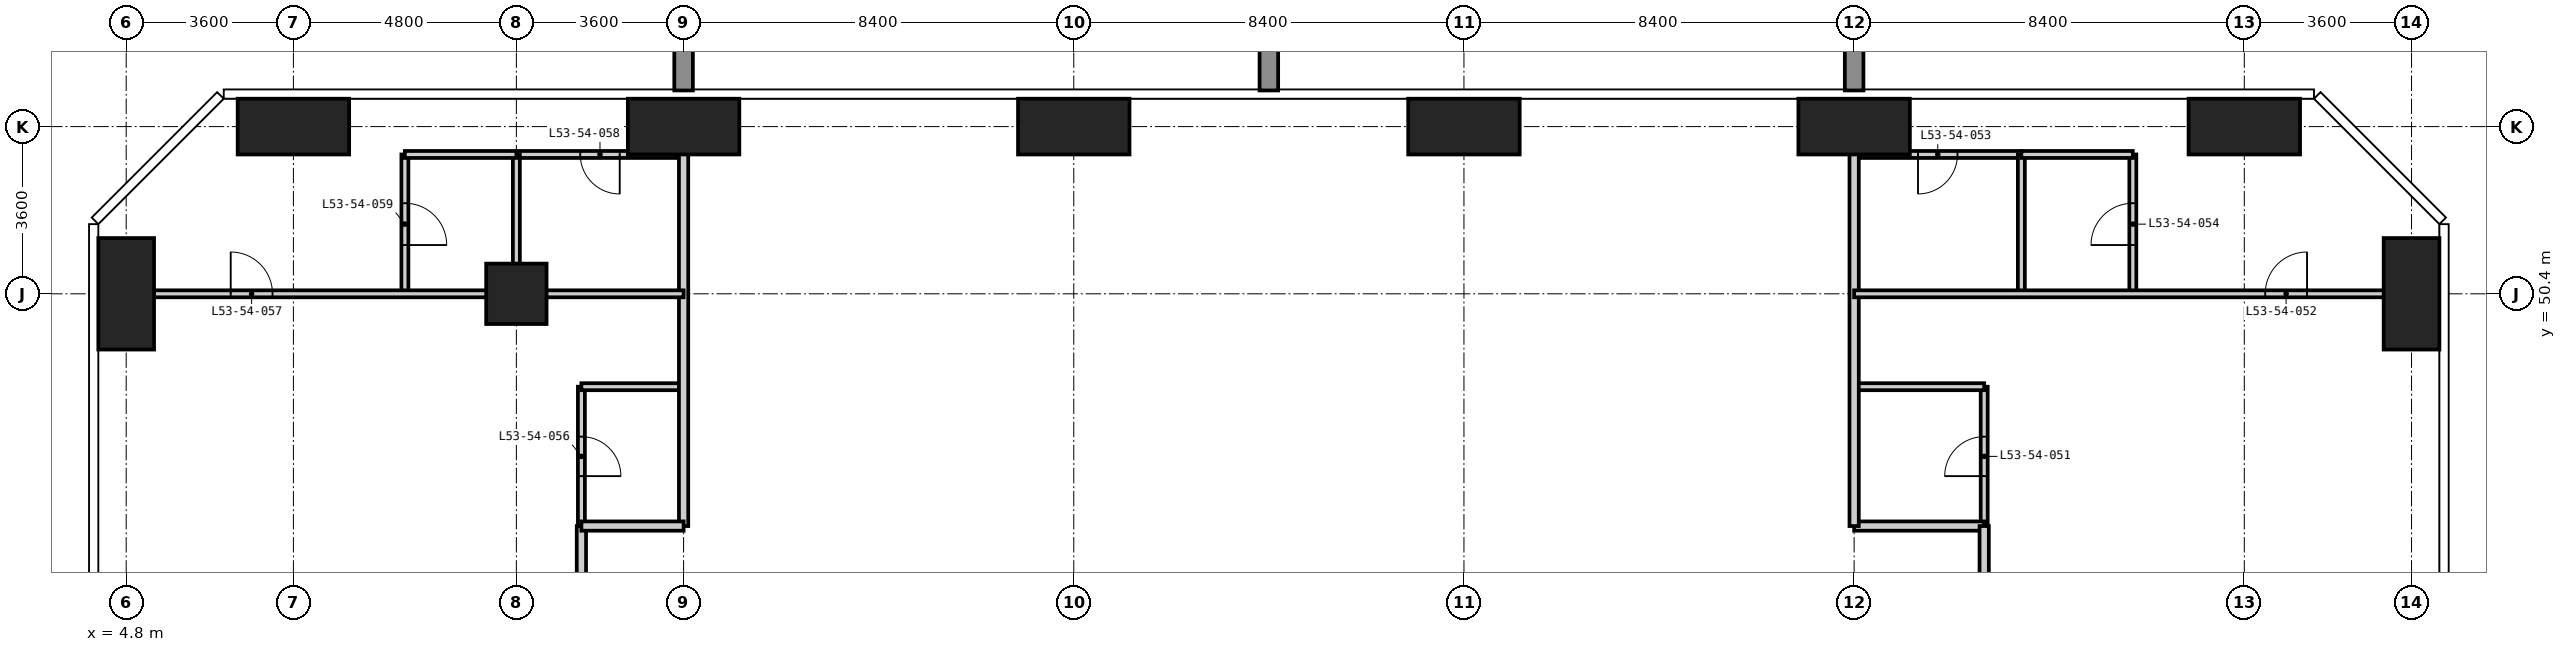
"""IFC4 building model, lengths in metres.
Left out: names, types, materials, properties, quantities, classifications, styles, units other than length and angle.
Written with IfcOpenShell. Run it as: python <this file> out.ifc"""

import sys

from ifc_helpers import new_model, si_unit, direction, frame, frame_2d, origin, origin_2d, place, context, subcontext, project, spatial, rectangle, extrude, element, fill, save


model = new_model("IFC4")
c1 = context("Model", 3, precision=1e-05, world=origin(), true_north=direction((0.0, 1.0)))
c2 = subcontext(c1, "Body", "Model", "MODEL_VIEW")
j1 = project(units=[si_unit("LENGTHUNIT", "METRE"), si_unit("PLANEANGLEUNIT", "RADIAN")], contexts=[c1])
p1 = place(None, origin())
s1 = spatial("IfcSite", under=j1, at=p1, CompositionType="ELEMENT")
p2 = place(p1, origin())
s2 = spatial("IfcBuilding", under=s1, at=p2, CompositionType="ELEMENT")
p3 = place(p2, frame((0.0, 0.0, 205.8)))
s3 = spatial("IfcBuildingStorey", under=s2, at=p3, CompositionType="ELEMENT", Elevation=205.8)
p4 = place(p3, frame((4.8, 50.4, -0.35), z_axis=(0.0, 0.0, 1.0), x_axis=(1.0, 0.0, 0.0)))
e1 = element("IfcColumn", 1, at=p4, inside=s3, PredefinedType="COLUMN", context=c2, shape_type="SweptSolid", body=[
    extrude(rectangle(XDim=1.2, YDim=2.4, at=origin_2d()), origin(), (0.0, 0.0, 1.0), 3.6),
])
p5 = place(p3, frame((8.4, 54.0, -0.35), z_axis=(0.0, 0.0, 1.0), x_axis=(1.0, 0.0, 0.0)))
e2 = element("IfcColumn", 2, at=p5, inside=s3, PredefinedType="COLUMN", context=c2, shape_type="SweptSolid", body=[
    extrude(rectangle(XDim=2.4, YDim=1.2, at=origin_2d()), origin(), (0.0, 0.0, 1.0), 3.6),
])
p6 = place(p3, frame((13.2, 50.4, -0.35), z_axis=(0.0, 0.0, 1.0), x_axis=(1.0, 0.0, 0.0)))
e3 = element("IfcColumn", 3, at=p6, inside=s3, PredefinedType="COLUMN", context=c2, shape_type="SweptSolid", body=[
    extrude(rectangle(XDim=1.3, YDim=1.3, at=origin_2d()), origin(), (0.0, 0.0, 1.0), 3.6),
])
for number, where, z_axis, x_axis in (
    (4, (16.8, 54.0, -0.35), (0.0, 0.0, 1.0), (1.0, 0.0, 0.0)),
    (5, (25.2, 54.0, -0.35), (0.0, 0.0, 1.0), (1.0, 0.0, 0.0)),
    (6, (33.6, 54.0, -0.35), (0.0, 0.0, 1.0), (1.0, 0.0, 0.0)),
    (7, (42.0, 54.0, -0.35), (0.0, 0.0, 1.0), (1.0, 0.0, 0.0)),
    (8, (50.4, 54.0, -0.35), (0.0, 0.0, 1.0), (1.0, 0.0, 0.0)),
):
    element("IfcColumn", number, at=place(p3, frame(where, z_axis=z_axis, x_axis=x_axis)), inside=s3, PredefinedType="COLUMN", context=c2, shape_type="SweptSolid", body=[
        extrude(rectangle(XDim=2.4, YDim=1.2, at=origin_2d()), origin(), (0.0, 0.0, 1.0), 3.6),
    ])
p7 = place(p3, frame((54.0, 50.4, -0.35), z_axis=(0.0, 0.0, 1.0), x_axis=(1.0, 0.0, 0.0)))
e9 = element("IfcColumn", 9, at=p7, inside=s3, PredefinedType="COLUMN", context=c2, shape_type="SweptSolid", body=[
    extrude(rectangle(XDim=1.2, YDim=2.4, at=origin_2d()), origin(), (0.0, 0.0, 1.0), 3.6),
])
p8 = place(p3, frame((14.6, 45.4, 0.0), z_axis=(0.0, 0.0, 1.0), x_axis=(0.0, 1.0, 0.0)))
e10 = element("IfcWall", 10, at=p8, inside=s3, PredefinedType="PARTITIONING", context=c2, shape_type="SweptSolid", body=[
    extrude(rectangle(XDim=3.0, YDim=0.15, at=frame_2d((1.5, 0.0))), origin(), (0.0, 0.0, 1.0), 3.25),
])
p9 = place(p8, frame((1.075, 0.0, 0.0)))
e11 = element("IfcOpeningElement", 11, at=p9, cuts=e10, PredefinedType="OPENING", context=c2, shape_type="SweptSolid", body=[
    extrude(rectangle(XDim=0.85, YDim=2.1, at=frame_2d((0.425, 1.05))), frame((0.0, 0.085, 0.0), z_axis=(0.0, -1.0, 0.0), x_axis=(1.0, 0.0, 0.0)), (0.0, 0.0, 1.0), 0.17),
])
p10 = place(p3, frame((44.8, 45.4, 0.0), z_axis=(0.0, 0.0, 1.0), x_axis=(0.0, 1.0, 0.0)))
e12 = element("IfcWall", 12, at=p10, inside=s3, PredefinedType="PARTITIONING", context=c2, shape_type="SweptSolid", body=[
    extrude(rectangle(XDim=3.0, YDim=0.15, at=frame_2d((1.5, 0.0))), origin(), (0.0, 0.0, 1.0), 3.25),
])
p11 = place(p10, frame((1.075, 0.0, 0.0)))
e13 = element("IfcOpeningElement", 13, at=p11, cuts=e12, PredefinedType="OPENING", context=c2, shape_type="SweptSolid", body=[
    extrude(rectangle(XDim=0.85, YDim=2.1, at=frame_2d((0.425, 1.05))), frame((0.0, 0.085, 0.0), z_axis=(0.0, -1.0, 0.0), x_axis=(1.0, 0.0, 0.0)), (0.0, 0.0, 1.0), 0.17),
])
p12 = place(p3, frame((14.6, 48.4, 0.0), z_axis=(0.0, 0.0, 1.0), x_axis=(1.0, 0.0, 0.0)))
e14 = element("IfcWall", 14, at=p12, inside=s3, PredefinedType="PARTITIONING", context=c2, shape_type="SweptSolid", body=[
    extrude(rectangle(XDim=2.2, YDim=0.15, at=frame_2d((1.1, 0.0))), origin(), (0.0, 0.0, 1.0), 3.25),
])
p13 = place(p3, frame((42.0, 48.4, 0.0), z_axis=(0.0, 0.0, 1.0), x_axis=(1.0, 0.0, 0.0)))
e15 = element("IfcWall", 15, at=p13, inside=s3, PredefinedType="PARTITIONING", context=c2, shape_type="SweptSolid", body=[
    extrude(rectangle(XDim=2.8, YDim=0.15, at=frame_2d((1.4, 0.0))), origin(), (0.0, 0.0, 1.0), 3.25),
])
p14 = place(p3, frame((13.2, 53.4, 0.0), z_axis=(0.0, 0.0, 1.0), x_axis=(1.0, 0.0, 0.0)))
e16 = element("IfcWall", 16, at=p14, inside=s3, PredefinedType="PARTITIONING", context=c2, shape_type="SweptSolid", body=[
    extrude(rectangle(XDim=3.6, YDim=0.15, at=frame_2d((1.8, 0.0))), origin(), (0.0, 0.0, 1.0), 3.25),
])
p15 = place(p14, frame((1.375, 0.0, 0.0)))
e17 = element("IfcOpeningElement", 17, at=p15, cuts=e16, PredefinedType="OPENING", context=c2, shape_type="SweptSolid", body=[
    extrude(rectangle(XDim=0.85, YDim=2.1, at=frame_2d((0.425, 1.05))), frame((0.0, 0.085, 0.0), z_axis=(0.0, -1.0, 0.0), x_axis=(1.0, 0.0, 0.0)), (0.0, 0.0, 1.0), 0.17),
])
p16 = place(p3, frame((42.0, 53.4, 0.0), z_axis=(0.0, 0.0, 1.0), x_axis=(1.0, 0.0, 0.0)))
e18 = element("IfcWall", 18, at=p16, inside=s3, PredefinedType="PARTITIONING", context=c2, shape_type="SweptSolid", body=[
    extrude(rectangle(XDim=3.6, YDim=0.15, at=frame_2d((1.8, 0.0))), origin(), (0.0, 0.0, 1.0), 3.25),
])
p17 = place(p16, frame((1.375, 0.0, 0.0)))
e19 = element("IfcOpeningElement", 19, at=p17, cuts=e18, PredefinedType="OPENING", context=c2, shape_type="SweptSolid", body=[
    extrude(rectangle(XDim=0.85, YDim=2.1, at=frame_2d((0.425, 1.05))), frame((0.0, 0.085, 0.0), z_axis=(0.0, -1.0, 0.0), x_axis=(1.0, 0.0, 0.0)), (0.0, 0.0, 1.0), 0.17),
])
p18 = place(p3, frame((14.6, 29.4, 0.0), z_axis=(0.0, 0.0, 1.0), x_axis=(0.0, 1.0, 0.0)))
e20 = element("IfcWall", 20, at=p18, inside=s3, PredefinedType="PARTITIONING", context=c2, shape_type="SweptSolid", body=[
    extrude(rectangle(XDim=16.0, YDim=0.2, at=frame_2d((8.0, 0.0))), origin(), (0.0, 0.0, 1.0), 3.25),
])
p19 = place(p18, frame((9.1, 0.0, 0.0)))
e21 = element("IfcOpeningElement", 21, at=p19, cuts=e20, PredefinedType="OPENING", context=c2, shape_type="SweptSolid", body=[
    extrude(rectangle(XDim=1.0, YDim=2.2, at=frame_2d((0.5, 1.1))), frame((0.0, 0.11, 0.0), z_axis=(0.0, -1.0, 0.0), x_axis=(1.0, 0.0, 0.0)), (0.0, 0.0, 1.0), 0.22),
])
p20 = place(p18, frame((13.8, 0.0, 0.0)))
e22 = element("IfcOpeningElement", 22, at=p20, cuts=e20, PredefinedType="OPENING", context=c2, shape_type="SweptSolid", body=[
    extrude(rectangle(XDim=1.0, YDim=2.2, at=frame_2d((0.5, 1.1))), frame((0.0, 0.11, 0.0), z_axis=(0.0, -1.0, 0.0), x_axis=(1.0, 0.0, 0.0)), (0.0, 0.0, 1.0), 0.22),
])
p21 = place(p3, frame((16.8, 45.4, 0.0), z_axis=(0.0, 0.0, 1.0), x_axis=(0.0, 1.0, 0.0)))
e23 = element("IfcWall", 23, at=p21, inside=s3, PredefinedType="PARTITIONING", context=c2, shape_type="SweptSolid", body=[
    extrude(rectangle(XDim=9.218, YDim=0.2, at=frame_2d((4.609, 0.0))), origin(), (0.0, 0.0, 1.0), 3.25),
])
p22 = place(p3, frame((14.6, 45.4, 0.0), z_axis=(0.0, 0.0, 1.0), x_axis=(1.0, 0.0, 0.0)))
e24 = element("IfcWall", 24, at=p22, inside=s3, PredefinedType="PARTITIONING", context=c2, shape_type="SweptSolid", body=[
    extrude(rectangle(XDim=2.2, YDim=0.2, at=frame_2d((1.1, 0.0))), origin(), (0.0, 0.0, 1.0), 3.25),
])
p23 = place(p3, frame((42.0, 45.4, 0.0), z_axis=(0.0, 0.0, 1.0), x_axis=(1.0, 0.0, 0.0)))
e25 = element("IfcWall", 25, at=p23, inside=s3, PredefinedType="PARTITIONING", context=c2, shape_type="SweptSolid", body=[
    extrude(rectangle(XDim=2.8, YDim=0.2, at=frame_2d((1.4, 0.0))), origin(), (0.0, 0.0, 1.0), 3.25),
])
p24 = place(p3, frame((42.0, 54.618, 0.0), z_axis=(0.0, 0.0, 1.0), x_axis=(0.0, -1.0, 0.0)))
e26 = element("IfcWall", 26, at=p24, inside=s3, PredefinedType="PARTITIONING", context=c2, shape_type="SweptSolid", body=[
    extrude(rectangle(XDim=9.218, YDim=0.2, at=frame_2d((4.609, 0.0))), origin(), (0.0, 0.0, 1.0), 3.25),
])
p25 = place(p3, frame((44.8, 45.4, 0.0), z_axis=(0.0, 0.0, 1.0), x_axis=(0.0, -1.0, 0.0)))
e27 = element("IfcWall", 27, at=p25, inside=s3, PredefinedType="PARTITIONING", context=c2, shape_type="SweptSolid", body=[
    extrude(rectangle(XDim=30.8, YDim=0.2, at=frame_2d((15.4, 0.0))), origin(), (0.0, 0.0, 1.0), 3.25),
])
p26 = place(p25, frame((26.0, 0.0, 0.0)))
e28 = element("IfcOpeningElement", 28, at=p26, cuts=e27, PredefinedType="OPENING", context=c2, shape_type="SweptSolid", body=[
    extrude(rectangle(XDim=1.0, YDim=2.2, at=frame_2d((0.5, 1.1))), frame((0.0, 0.11, 0.0), z_axis=(0.0, -1.0, 0.0), x_axis=(1.0, 0.0, 0.0)), (0.0, 0.0, 1.0), 0.22),
])
p27 = place(p25, frame((21.8, 0.0, 0.0)))
e29 = element("IfcOpeningElement", 29, at=p27, cuts=e27, PredefinedType="OPENING", context=c2, shape_type="SweptSolid", body=[
    extrude(rectangle(XDim=1.0, YDim=2.2, at=frame_2d((0.5, 1.1))), frame((0.0, 0.11, 0.0), z_axis=(0.0, -1.0, 0.0), x_axis=(1.0, 0.0, 0.0)), (0.0, 0.0, 1.0), 0.22),
])
p28 = place(p25, frame((16.7, 0.0, 0.0)))
e30 = element("IfcOpeningElement", 30, at=p28, cuts=e27, PredefinedType="OPENING", context=c2, shape_type="SweptSolid", body=[
    extrude(rectangle(XDim=1.0, YDim=2.2, at=frame_2d((0.5, 1.1))), frame((0.0, 0.11, 0.0), z_axis=(0.0, -1.0, 0.0), x_axis=(1.0, 0.0, 0.0)), (0.0, 0.0, 1.0), 0.22),
])
p29 = place(p25, frame((5.0, 0.0, 0.0)))
e31 = element("IfcOpeningElement", 31, at=p29, cuts=e27, PredefinedType="OPENING", context=c2, shape_type="SweptSolid", body=[
    extrude(rectangle(XDim=1.0, YDim=2.2, at=frame_2d((0.5, 1.1))), frame((0.0, 0.11, 0.0), z_axis=(0.0, -1.0, 0.0), x_axis=(1.0, 0.0, 0.0)), (0.0, 0.0, 1.0), 0.22),
])
p30 = place(p25, frame((29.2, 0.0, 0.0)))
e32 = element("IfcOpeningElement", 32, at=p30, cuts=e27, PredefinedType="OPENING", context=c2, shape_type="SweptSolid", body=[
    extrude(rectangle(XDim=1.0, YDim=2.2, at=frame_2d((0.5, 1.1))), frame((0.0, 0.11, 0.0), z_axis=(0.0, -1.0, 0.0), x_axis=(1.0, 0.0, 0.0)), (0.0, 0.0, 1.0), 0.22),
])
p31 = place(p25, frame((1.2, 0.0, 0.0)))
e33 = element("IfcOpeningElement", 33, at=p31, cuts=e27, PredefinedType="OPENING", context=c2, shape_type="SweptSolid", body=[
    extrude(rectangle(XDim=1.0, YDim=2.2, at=frame_2d((0.5, 1.1))), frame((0.0, 0.11, 0.0), z_axis=(0.0, -1.0, 0.0), x_axis=(1.0, 0.0, 0.0)), (0.0, 0.0, 1.0), 0.22),
])
p32 = place(p3, frame((10.8, 50.4, 0.0), z_axis=(0.0, 0.0, 1.0), x_axis=(0.0, 1.0, 0.0)))
e34 = element("IfcWall", 34, at=p32, inside=s3, PredefinedType="PARTITIONING", context=c2, shape_type="SweptSolid", body=[
    extrude(rectangle(XDim=3.0, YDim=0.15, at=frame_2d((1.5, 0.0))), origin(), (0.0, 0.0, 1.0), 3.25),
])
p33 = place(p32, frame((1.05, 0.0, 0.0)))
e35 = element("IfcOpeningElement", 35, at=p33, cuts=e34, PredefinedType="OPENING", context=c2, shape_type="SweptSolid", body=[
    extrude(rectangle(XDim=0.9, YDim=2.1, at=frame_2d((0.45, 1.05))), frame((0.0, 0.085, 0.0), z_axis=(0.0, -1.0, 0.0), x_axis=(1.0, 0.0, 0.0)), (0.0, 0.0, 1.0), 0.17),
])
for number, where, z_axis, x_axis in (
    (36, (13.2, 50.4, 0.0), (0.0, 0.0, 1.0), (0.0, 1.0, 0.0)),
    (37, (45.6, 50.4, 0.0), (0.0, 0.0, 1.0), (0.0, 1.0, 0.0)),
):
    element("IfcWall", number, at=place(p3, frame(where, z_axis=z_axis, x_axis=x_axis)), inside=s3, PredefinedType="PARTITIONING", context=c2, shape_type="SweptSolid", body=[
        extrude(rectangle(XDim=3.0, YDim=0.15, at=frame_2d((1.5, 0.0))), origin(), (0.0, 0.0, 1.0), 3.25),
    ])
p34 = place(p3, frame((48.0, 50.4, 0.0), z_axis=(0.0, 0.0, 1.0), x_axis=(0.0, 1.0, 0.0)))
e38 = element("IfcWall", 38, at=p34, inside=s3, PredefinedType="PARTITIONING", context=c2, shape_type="SweptSolid", body=[
    extrude(rectangle(XDim=3.0, YDim=0.15, at=frame_2d((1.5, 0.0))), origin(), (0.0, 0.0, 1.0), 3.25),
])
p35 = place(p34, frame((1.05, 0.0, 0.0)))
e39 = element("IfcOpeningElement", 39, at=p35, cuts=e38, PredefinedType="OPENING", context=c2, shape_type="SweptSolid", body=[
    extrude(rectangle(XDim=0.9, YDim=2.1, at=frame_2d((0.45, 1.05))), frame((0.0, 0.085, 0.0), z_axis=(0.0, -1.0, 0.0), x_axis=(1.0, 0.0, 0.0)), (0.0, 0.0, 1.0), 0.17),
])
p36 = place(p3, frame((4.182, 50.4, 0.0), z_axis=(0.0, 0.0, 1.0), x_axis=(1.0, 0.0, 0.0)))
e40 = element("IfcWall", 40, at=p36, inside=s3, PredefinedType="PARTITIONING", context=c2, shape_type="SweptSolid", body=[
    extrude(rectangle(XDim=12.618, YDim=0.15, at=frame_2d((6.309, 0.0))), origin(), (0.0, 0.0, 1.0), 3.25),
])
p37 = place(p36, frame((2.868, 0.0, 0.0)))
e41 = element("IfcOpeningElement", 41, at=p37, cuts=e40, PredefinedType="OPENING", context=c2, shape_type="SweptSolid", body=[
    extrude(rectangle(XDim=0.9, YDim=2.1, at=frame_2d((0.45, 1.05))), frame((0.0, 0.085, 0.0), z_axis=(0.0, -1.0, 0.0), x_axis=(1.0, 0.0, 0.0)), (0.0, 0.0, 1.0), 0.17),
])
p38 = place(p3, frame((42.0, 50.4, 0.0), z_axis=(0.0, 0.0, 1.0), x_axis=(1.0, 0.0, 0.0)))
e42 = element("IfcWall", 42, at=p38, inside=s3, PredefinedType="PARTITIONING", context=c2, shape_type="SweptSolid", body=[
    extrude(rectangle(XDim=12.618, YDim=0.15, at=frame_2d((6.309, 0.0))), origin(), (0.0, 0.0, 1.0), 3.25),
])
p39 = place(p38, frame((8.85, 0.0, 0.0)))
e43 = element("IfcOpeningElement", 43, at=p39, cuts=e42, PredefinedType="OPENING", context=c2, shape_type="SweptSolid", body=[
    extrude(rectangle(XDim=0.9, YDim=2.1, at=frame_2d((0.45, 1.05))), frame((0.0, 0.085, 0.0), z_axis=(0.0, -1.0, 0.0), x_axis=(1.0, 0.0, 0.0)), (0.0, 0.0, 1.0), 0.17),
])
for number, where, z_axis, x_axis in (
    (44, (10.8, 53.4, 0.0), (0.0, 0.0, 1.0), (1.0, 0.0, 0.0)),
    (45, (45.6, 53.4, 0.0), (0.0, 0.0, 1.0), (1.0, 0.0, 0.0)),
):
    element("IfcWall", number, at=place(p3, frame(where, z_axis=z_axis, x_axis=x_axis)), inside=s3, PredefinedType="PARTITIONING", context=c2, shape_type="SweptSolid", body=[
        extrude(rectangle(XDim=2.4, YDim=0.15, at=frame_2d((1.2, 0.0))), origin(), (0.0, 0.0, 1.0), 3.25),
    ])
p40 = place(p11, origin())
e46 = element("IfcDoor", 46, at=p40, inside=s3, OperationType="SINGLE_SWING_LEFT", PredefinedType="DOOR", context=c2, shape_type="SweptSolid", body=[
    extrude(rectangle(XDim=0.85, YDim=2.1, at=frame_2d((0.425, 1.05))), frame((0.0, 0.025, 0.0), z_axis=(0.0, -1.0, 0.0), x_axis=(1.0, 0.0, 0.0)), (0.0, 0.0, 1.0), 0.05),
])
fill(e13, e46)
p41 = place(p39, origin())
e47 = element("IfcDoor", 47, at=p41, inside=s3, OperationType="SINGLE_SWING_RIGHT", PredefinedType="DOOR", context=c2, shape_type="SweptSolid", body=[
    extrude(rectangle(XDim=0.9, YDim=2.1, at=frame_2d((0.45, 1.05))), frame((0.0, 0.025, 0.0), z_axis=(0.0, -1.0, 0.0), x_axis=(1.0, 0.0, 0.0)), (0.0, 0.0, 1.0), 0.05),
])
fill(e43, e47)
p42 = place(p17, frame((0.85, 0.0, 0.0), z_axis=(0.0, 0.0, 1.0), x_axis=(-1.0, 0.0, 0.0)))
e48 = element("IfcDoor", 48, at=p42, inside=s3, OperationType="SINGLE_SWING_RIGHT", PredefinedType="DOOR", context=c2, shape_type="SweptSolid", body=[
    extrude(rectangle(XDim=0.85, YDim=2.1, at=frame_2d((0.425, 1.05))), frame((0.0, 0.025, 0.0), z_axis=(0.0, -1.0, 0.0), x_axis=(1.0, 0.0, 0.0)), (0.0, 0.0, 1.0), 0.05),
])
fill(e19, e48)
p43 = place(p35, origin())
e49 = element("IfcDoor", 49, at=p43, inside=s3, OperationType="SINGLE_SWING_LEFT", PredefinedType="DOOR", context=c2, shape_type="SweptSolid", body=[
    extrude(rectangle(XDim=0.9, YDim=2.1, at=frame_2d((0.45, 1.05))), frame((0.0, 0.025, 0.0), z_axis=(0.0, -1.0, 0.0), x_axis=(1.0, 0.0, 0.0)), (0.0, 0.0, 1.0), 0.05),
])
fill(e39, e49)
p44 = place(p9, frame((0.85, 0.0, 0.0), z_axis=(0.0, 0.0, 1.0), x_axis=(-1.0, 0.0, 0.0)))
e50 = element("IfcDoor", 50, at=p44, inside=s3, OperationType="SINGLE_SWING_RIGHT", PredefinedType="DOOR", context=c2, shape_type="SweptSolid", body=[
    extrude(rectangle(XDim=0.85, YDim=2.1, at=frame_2d((0.425, 1.05))), frame((0.0, 0.025, 0.0), z_axis=(0.0, -1.0, 0.0), x_axis=(1.0, 0.0, 0.0)), (0.0, 0.0, 1.0), 0.05),
])
fill(e11, e50)
p45 = place(p37, origin())
e51 = element("IfcDoor", 51, at=p45, inside=s3, OperationType="SINGLE_SWING_LEFT", PredefinedType="DOOR", context=c2, shape_type="SweptSolid", body=[
    extrude(rectangle(XDim=0.9, YDim=2.1, at=frame_2d((0.45, 1.05))), frame((0.0, 0.025, 0.0), z_axis=(0.0, -1.0, 0.0), x_axis=(1.0, 0.0, 0.0)), (0.0, 0.0, 1.0), 0.05),
])
fill(e41, e51)
p46 = place(p15, frame((0.85, 0.0, 0.0), z_axis=(0.0, 0.0, 1.0), x_axis=(-1.0, 0.0, 0.0)))
e52 = element("IfcDoor", 52, at=p46, inside=s3, OperationType="SINGLE_SWING_LEFT", PredefinedType="DOOR", context=c2, shape_type="SweptSolid", body=[
    extrude(rectangle(XDim=0.85, YDim=2.1, at=frame_2d((0.425, 1.05))), frame((0.0, 0.025, 0.0), z_axis=(0.0, -1.0, 0.0), x_axis=(1.0, 0.0, 0.0)), (0.0, 0.0, 1.0), 0.05),
])
fill(e17, e52)
p47 = place(p33, frame((0.9, 0.0, 0.0), z_axis=(0.0, 0.0, 1.0), x_axis=(-1.0, 0.0, 0.0)))
e53 = element("IfcDoor", 53, at=p47, inside=s3, OperationType="SINGLE_SWING_RIGHT", PredefinedType="DOOR", context=c2, shape_type="SweptSolid", body=[
    extrude(rectangle(XDim=0.9, YDim=2.1, at=frame_2d((0.45, 1.05))), frame((0.0, 0.025, 0.0), z_axis=(0.0, -1.0, 0.0), x_axis=(1.0, 0.0, 0.0)), (0.0, 0.0, 1.0), 0.05),
])
fill(e35, e53)
save(model, sys.argv[1])
